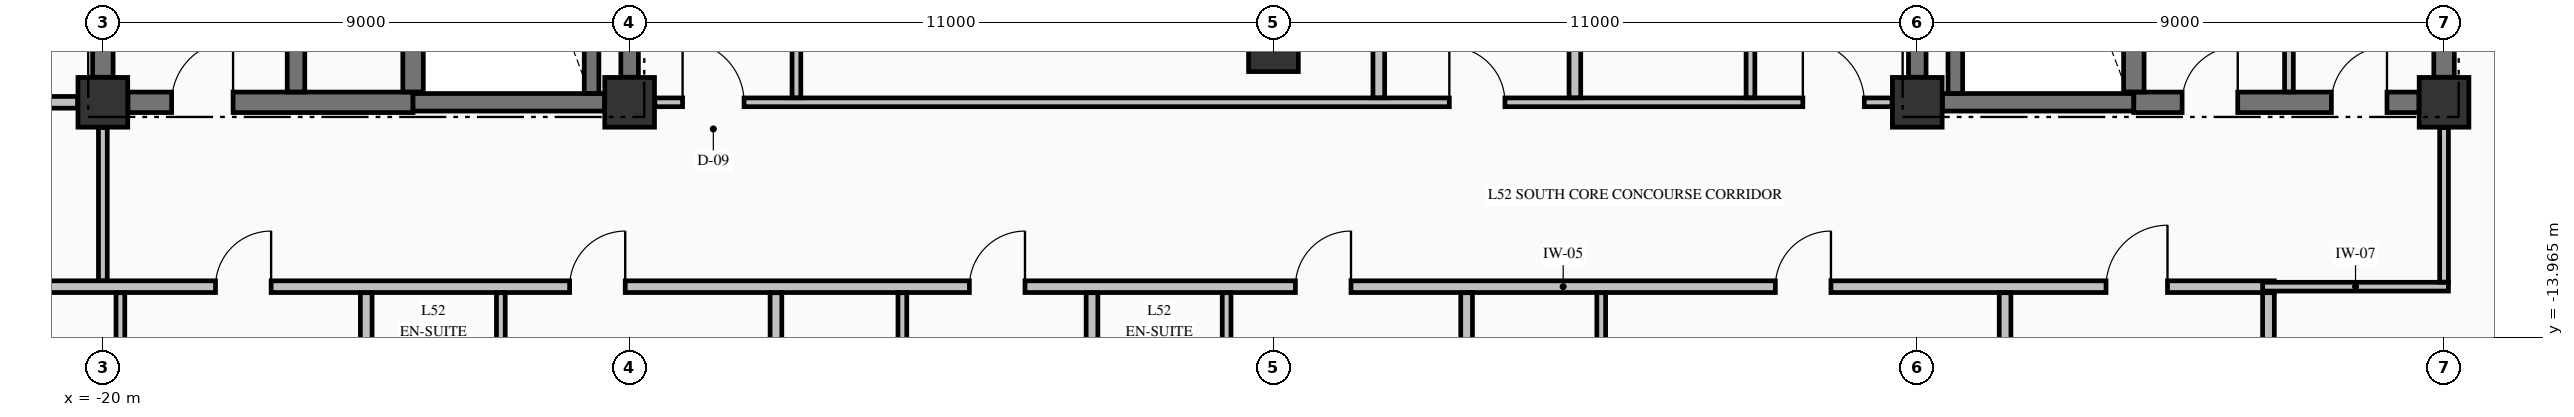
"""IFC4 building model, lengths in metres.
Left out: names, types, materials, properties, quantities, classifications, styles, units other than length and angle.
Written with IfcOpenShell. Run it as: python <this file> out.ifc"""

import sys

from ifc_helpers import new_model, si_unit, direction, frame, frame_2d, origin, origin_2d, place, context, subcontext, project, spatial, rectangle, extrude, element, fill, save


model = new_model("IFC4")
c1 = context("Model", 3, precision=1e-05, world=origin(), true_north=direction((0.0, 1.0)))
c2 = subcontext(c1, "Body", "Model", "MODEL_VIEW")
j1 = project(units=[si_unit("LENGTHUNIT", "METRE"), si_unit("PLANEANGLEUNIT", "RADIAN")], contexts=[c1])
p1 = place(None, origin())
s1 = spatial("IfcSite", under=j1, at=p1, CompositionType="ELEMENT")
p2 = place(p1, origin())
s2 = spatial("IfcBuilding", under=s1, at=p2, CompositionType="ELEMENT")
p3 = place(p2, frame((0.0, 0.0, 201.66)))
s3 = spatial("IfcBuildingStorey", under=s2, at=p3, CompositionType="ELEMENT", Elevation=201.66)
for number, where, z_axis, x_axis in (
    (1, (-20.0, -9.95, -0.25), (0.0, 0.0, 1.0), (1.0, 0.0, 0.0)),
    (2, (-11.0, -9.95, -0.25), (0.0, 0.0, 1.0), (1.0, 0.0, 0.0)),
    (3, (11.0, -9.95, -0.25), (0.0, 0.0, 1.0), (1.0, 0.0, 0.0)),
    (4, (20.0, -9.95, -0.25), (0.0, 0.0, 1.0), (1.0, 0.0, 0.0)),
    (5, (0.0, -9.0, -0.25), (0.0, 0.0, 1.0), (1.0, 0.0, 0.0)),
):
    element("IfcColumn", number, at=place(p3, frame(where, z_axis=z_axis, x_axis=x_axis)), inside=s3, PredefinedType="COLUMN", context=c2, shape_type="SweptSolid", body=[
        extrude(rectangle(XDim=0.85, YDim=0.85, at=origin_2d()), origin(), (0.0, 0.0, 1.0), 3.4),
    ])
p4 = place(p3, frame((-19.571, -9.95, 0.0), z_axis=(0.0, 0.0, 1.0), x_axis=(1.0, 0.0, 0.0)))
e6 = element("IfcWall", 6, at=p4, inside=s3, PredefinedType="SHEAR", context=c2, shape_type="SweptSolid", body=[
    extrude(rectangle(XDim=4.871, YDim=0.35, at=frame_2d((2.436, 0.0))), origin(), (0.0, 0.0, 1.0), 3.15),
])
p5 = place(p4, frame((0.746, 0.0, 0.0)))
e7 = element("IfcOpeningElement", 7, at=p5, cuts=e6, PredefinedType="OPENING", context=c2, shape_type="SweptSolid", body=[
    extrude(rectangle(XDim=1.05, YDim=2.15, at=frame_2d((0.525, 1.075))), frame((0.0, 0.185, 0.0), z_axis=(0.0, -1.0, 0.0), x_axis=(1.0, 0.0, 0.0)), (0.0, 0.0, 1.0), 0.37),
])
for number, where, z_axis, x_axis in (
    (8, (-14.7, -9.95, 0.0), (0.0, 0.0, 1.0), (1.0, 0.0, 0.0)),
    (9, (11.429, -9.95, 0.0), (0.0, 0.0, 1.0), (1.0, 0.0, 0.0)),
):
    element("IfcWall", number, at=place(p3, frame(where, z_axis=z_axis, x_axis=x_axis)), inside=s3, PredefinedType="SHEAR", context=c2, shape_type="SweptSolid", body=[
        extrude(rectangle(XDim=3.271, YDim=0.3, at=frame_2d((1.635, 0.0))), origin(), (0.0, 0.0, 1.0), 3.15),
    ])
p6 = place(p3, frame((14.7, -9.95, 0.0), z_axis=(0.0, 0.0, 1.0), x_axis=(1.0, 0.0, 0.0)))
e10 = element("IfcWall", 10, at=p6, inside=s3, PredefinedType="SHEAR", context=c2, shape_type="SweptSolid", body=[
    extrude(rectangle(XDim=4.871, YDim=0.35, at=frame_2d((2.436, 0.0))), origin(), (0.0, 0.0, 1.0), 3.15),
])
p7 = place(p6, frame((0.825, 0.0, 0.0)))
e11 = element("IfcOpeningElement", 11, at=p7, cuts=e10, PredefinedType="OPENING", context=c2, shape_type="SweptSolid", body=[
    extrude(rectangle(XDim=0.95, YDim=2.15, at=frame_2d((0.475, 1.075))), frame((0.0, 0.185, 0.0), z_axis=(0.0, -1.0, 0.0), x_axis=(1.0, 0.0, 0.0)), (0.0, 0.0, 1.0), 0.37),
])
p8 = place(p6, frame((3.375, 0.0, 0.0)))
e12 = element("IfcOpeningElement", 12, at=p8, cuts=e10, PredefinedType="OPENING", context=c2, shape_type="SweptSolid", body=[
    extrude(rectangle(XDim=0.95, YDim=2.15, at=frame_2d((0.475, 1.075))), frame((0.0, 0.185, 0.0), z_axis=(0.0, -1.0, 0.0), x_axis=(1.0, 0.0, 0.0)), (0.0, 0.0, 1.0), 0.37),
])
p9 = place(p3, frame((-22.1, -13.1, 0.0), z_axis=(0.0, 0.0, 1.0), x_axis=(1.0, 0.0, 0.0)))
e13 = element("IfcWall", 13, at=p9, inside=s3, PredefinedType="PARTITIONING", context=c2, shape_type="SweptSolid", body=[
    extrude(rectangle(XDim=39.2, YDim=0.2, at=frame_2d((19.6, 0.0))), origin(), (0.0, 0.0, 1.0), 3.15),
])
p10 = place(p9, frame((4.025, 0.0, 0.0)))
e14 = element("IfcOpeningElement", 14, at=p10, cuts=e13, PredefinedType="OPENING", context=c2, shape_type="SweptSolid", body=[
    extrude(rectangle(XDim=0.95, YDim=2.15, at=frame_2d((0.475, 1.075))), frame((0.0, 0.11, 0.0), z_axis=(0.0, -1.0, 0.0), x_axis=(1.0, 0.0, 0.0)), (0.0, 0.0, 1.0), 0.22),
])
p11 = place(p9, frame((10.075, 0.0, 0.0)))
e15 = element("IfcOpeningElement", 15, at=p11, cuts=e13, PredefinedType="OPENING", context=c2, shape_type="SweptSolid", body=[
    extrude(rectangle(XDim=0.95, YDim=2.15, at=frame_2d((0.475, 1.075))), frame((0.0, 0.11, 0.0), z_axis=(0.0, -1.0, 0.0), x_axis=(1.0, 0.0, 0.0)), (0.0, 0.0, 1.0), 0.22),
])
p12 = place(p9, frame((16.905, 0.0, 0.0)))
e16 = element("IfcOpeningElement", 16, at=p12, cuts=e13, PredefinedType="OPENING", context=c2, shape_type="SweptSolid", body=[
    extrude(rectangle(XDim=0.95, YDim=2.15, at=frame_2d((0.475, 1.075))), frame((0.0, 0.11, 0.0), z_axis=(0.0, -1.0, 0.0), x_axis=(1.0, 0.0, 0.0)), (0.0, 0.0, 1.0), 0.22),
])
p13 = place(p9, frame((22.475, 0.0, 0.0)))
e17 = element("IfcOpeningElement", 17, at=p13, cuts=e13, PredefinedType="OPENING", context=c2, shape_type="SweptSolid", body=[
    extrude(rectangle(XDim=0.95, YDim=2.15, at=frame_2d((0.475, 1.075))), frame((0.0, 0.11, 0.0), z_axis=(0.0, -1.0, 0.0), x_axis=(1.0, 0.0, 0.0)), (0.0, 0.0, 1.0), 0.22),
])
p14 = place(p9, frame((30.675, 0.0, 0.0)))
e18 = element("IfcOpeningElement", 18, at=p14, cuts=e13, PredefinedType="OPENING", context=c2, shape_type="SweptSolid", body=[
    extrude(rectangle(XDim=0.95, YDim=2.15, at=frame_2d((0.475, 1.075))), frame((0.0, 0.11, 0.0), z_axis=(0.0, -1.0, 0.0), x_axis=(1.0, 0.0, 0.0)), (0.0, 0.0, 1.0), 0.22),
])
p15 = place(p9, frame((36.325, 0.0, 0.0)))
e19 = element("IfcOpeningElement", 19, at=p15, cuts=e13, PredefinedType="OPENING", context=c2, shape_type="SweptSolid", body=[
    extrude(rectangle(XDim=1.05, YDim=2.15, at=frame_2d((0.525, 1.075))), frame((0.0, 0.11, 0.0), z_axis=(0.0, -1.0, 0.0), x_axis=(1.0, 0.0, 0.0)), (0.0, 0.0, 1.0), 0.22),
])
p16 = place(p3, frame((16.9, -13.1, 0.0), z_axis=(0.0, 0.0, 1.0), x_axis=(1.0, 0.0, 0.0)))
e20 = element("IfcWall", 20, at=p16, inside=s3, PredefinedType="PARTITIONING", context=c2, shape_type="SweptSolid", body=[
    extrude(rectangle(XDim=3.175, YDim=0.15, at=frame_2d((1.587, 0.0))), origin(), (0.0, 0.0, 1.0), 3.15),
])
p17 = place(p3, frame((-26.835, -9.95, 0.0), z_axis=(0.0, 0.0, 1.0), x_axis=(1.0, 0.0, 0.0)))
e21 = element("IfcWall", 21, at=p17, inside=s3, PredefinedType="PARTITIONING", context=c2, shape_type="SweptSolid", body=[
    extrude(rectangle(XDim=6.404, YDim=0.2, at=frame_2d((3.202, 0.0))), origin(), (0.0, 0.0, 1.0), 3.15),
])
p18 = place(p3, frame((-10.569, -9.95, 0.0), z_axis=(0.0, 0.0, 1.0), x_axis=(1.0, 0.0, 0.0)))
e22 = element("IfcWall", 22, at=p18, inside=s3, PredefinedType="PARTITIONING", context=c2, shape_type="SweptSolid", body=[
    extrude(rectangle(XDim=21.138, YDim=0.15, at=frame_2d((10.569, 0.0))), origin(), (0.0, 0.0, 1.0), 3.15),
])
p19 = place(p18, frame((0.474, 0.0, 0.0)))
e23 = element("IfcOpeningElement", 23, at=p19, cuts=e22, PredefinedType="OPENING", context=c2, shape_type="SweptSolid", body=[
    extrude(rectangle(XDim=1.05, YDim=2.15, at=frame_2d((0.525, 1.075))), frame((0.0, 0.085, 0.0), z_axis=(0.0, -1.0, 0.0), x_axis=(1.0, 0.0, 0.0)), (0.0, 0.0, 1.0), 0.17),
])
p20 = place(p18, frame((19.614, 0.0, 0.0)))
e24 = element("IfcOpeningElement", 24, at=p20, cuts=e22, PredefinedType="OPENING", context=c2, shape_type="SweptSolid", body=[
    extrude(rectangle(XDim=1.05, YDim=2.15, at=frame_2d((0.525, 1.075))), frame((0.0, 0.085, 0.0), z_axis=(0.0, -1.0, 0.0), x_axis=(1.0, 0.0, 0.0)), (0.0, 0.0, 1.0), 0.17),
])
p21 = place(p18, frame((13.574, 0.0, 0.0)))
e25 = element("IfcOpeningElement", 25, at=p21, cuts=e22, PredefinedType="OPENING", context=c2, shape_type="SweptSolid", body=[
    extrude(rectangle(XDim=0.95, YDim=2.15, at=frame_2d((0.475, 1.075))), frame((0.0, 0.085, 0.0), z_axis=(0.0, -1.0, 0.0), x_axis=(1.0, 0.0, 0.0)), (0.0, 0.0, 1.0), 0.17),
])
p22 = place(p3, frame((-20.0, -9.521, 0.0), z_axis=(0.0, 0.0, 1.0), x_axis=(0.0, 1.0, 0.0)))
e26 = element("IfcWall", 26, at=p22, inside=s3, PredefinedType="SHEAR", context=c2, shape_type="SweptSolid", body=[
    extrude(rectangle(XDim=9.092, YDim=0.35, at=frame_2d((4.546, 0.0))), origin(), (0.0, 0.0, 1.0), 3.15),
])
p23 = place(p3, frame((-16.7, -9.773, 0.0), z_axis=(0.0, 0.0, 1.0), x_axis=(0.0, 1.0, 0.0)))
e27 = element("IfcWall", 27, at=p23, inside=s3, PredefinedType="SHEAR", context=c2, shape_type="SweptSolid", body=[
    extrude(rectangle(XDim=9.371, YDim=0.3, at=frame_2d((4.686, 0.0))), origin(), (0.0, 0.0, 1.0), 3.15),
])
p24 = place(p3, frame((-14.7, -9.773, 0.0), z_axis=(0.0, 0.0, 1.0), x_axis=(0.0, 1.0, 0.0)))
e28 = element("IfcWall", 28, at=p24, inside=s3, PredefinedType="SHEAR", context=c2, shape_type="SweptSolid", body=[
    extrude(rectangle(XDim=9.371, YDim=0.35, at=frame_2d((4.686, 0.0))), origin(), (0.0, 0.0, 1.0), 3.15),
])
p25 = place(p3, frame((-11.65, -9.798, 0.0), z_axis=(0.0, 0.0, 1.0), x_axis=(0.0, 1.0, 0.0)))
e29 = element("IfcWall", 29, at=p25, inside=s3, PredefinedType="SOLIDWALL", context=c2, shape_type="SweptSolid", body=[
    extrude(rectangle(XDim=9.396, YDim=0.25, at=frame_2d((4.698, 0.0))), origin(), (0.0, 0.0, 1.0), 3.15),
])
for number, where, z_axis, x_axis in (
    (30, (-11.0, -9.521, 0.0), (0.0, 0.0, 1.0), (0.0, 1.0, 0.0)),
    (31, (11.0, -9.521, 0.0), (0.0, 0.0, 1.0), (0.0, 1.0, 0.0)),
):
    element("IfcWall", number, at=place(p3, frame(where, z_axis=z_axis, x_axis=x_axis)), inside=s3, PredefinedType="SHEAR", context=c2, shape_type="SweptSolid", body=[
        extrude(rectangle(XDim=9.092, YDim=0.3, at=frame_2d((4.546, 0.0))), origin(), (0.0, 0.0, 1.0), 3.15),
    ])
p26 = place(p3, frame((11.65, -9.798, 0.0), z_axis=(0.0, 0.0, 1.0), x_axis=(0.0, 1.0, 0.0)))
e32 = element("IfcWall", 32, at=p26, inside=s3, PredefinedType="SOLIDWALL", context=c2, shape_type="SweptSolid", body=[
    extrude(rectangle(XDim=9.396, YDim=0.25, at=frame_2d((4.698, 0.0))), origin(), (0.0, 0.0, 1.0), 3.15),
])
p27 = place(p3, frame((14.7, -9.773, 0.0), z_axis=(0.0, 0.0, 1.0), x_axis=(0.0, 1.0, 0.0)))
e33 = element("IfcWall", 33, at=p27, inside=s3, PredefinedType="SHEAR", context=c2, shape_type="SweptSolid", body=[
    extrude(rectangle(XDim=9.371, YDim=0.35, at=frame_2d((4.686, 0.0))), origin(), (0.0, 0.0, 1.0), 3.15),
])
p28 = place(p3, frame((20.0, -9.521, 0.0), z_axis=(0.0, 0.0, 1.0), x_axis=(0.0, 1.0, 0.0)))
e34 = element("IfcWall", 34, at=p28, inside=s3, PredefinedType="SHEAR", context=c2, shape_type="SweptSolid", body=[
    extrude(rectangle(XDim=9.092, YDim=0.35, at=frame_2d((4.546, 0.0))), origin(), (0.0, 0.0, 1.0), 3.15),
])
p29 = place(p3, frame((-20.0, -12.997, 0.0), z_axis=(0.0, 0.0, 1.0), x_axis=(0.0, 1.0, 0.0)))
e35 = element("IfcWall", 35, at=p29, inside=s3, PredefinedType="PARTITIONING", context=c2, shape_type="SweptSolid", body=[
    extrude(rectangle(XDim=2.616, YDim=0.15, at=frame_2d((1.308, 0.0))), origin(), (0.0, 0.0, 1.0), 2.342),
])
p30 = place(p3, frame((-19.7, -15.272, 0.0), z_axis=(0.0, 0.0, 1.0), x_axis=(0.0, 1.0, 0.0)))
e36 = element("IfcWall", 36, at=p30, inside=s3, PredefinedType="PARTITIONING", context=c2, shape_type="SweptSolid", body=[
    extrude(rectangle(XDim=2.069, YDim=0.15, at=frame_2d((1.035, 0.0))), origin(), (0.0, 0.0, 1.0), 2.342),
])
p31 = place(p3, frame((-15.5, -15.972, 0.0), z_axis=(0.0, 0.0, 1.0), x_axis=(0.0, 1.0, 0.0)))
e37 = element("IfcWall", 37, at=p31, inside=s3, PredefinedType="PARTITIONING", context=c2, shape_type="SweptSolid", body=[
    extrude(rectangle(XDim=2.769, YDim=0.2, at=frame_2d((1.385, 0.0))), origin(), (0.0, 0.0, 1.0), 3.15),
])
p32 = place(p3, frame((-13.2, -15.972, 0.0), z_axis=(0.0, 0.0, 1.0), x_axis=(0.0, 1.0, 0.0)))
e38 = element("IfcWall", 38, at=p32, inside=s3, PredefinedType="PARTITIONING", context=c2, shape_type="SweptSolid", body=[
    extrude(rectangle(XDim=2.769, YDim=0.15, at=frame_2d((1.385, 0.0))), origin(), (0.0, 0.0, 1.0), 3.15),
])
p33 = place(p3, frame((-8.5, -15.272, 0.0), z_axis=(0.0, 0.0, 1.0), x_axis=(0.0, 1.0, 0.0)))
e39 = element("IfcWall", 39, at=p33, inside=s3, PredefinedType="PARTITIONING", context=c2, shape_type="SweptSolid", body=[
    extrude(rectangle(XDim=2.069, YDim=0.2, at=frame_2d((1.035, 0.0))), origin(), (0.0, 0.0, 1.0), 3.15),
])
p34 = place(p3, frame((-8.15, -9.872, 0.0), z_axis=(0.0, 0.0, 1.0), x_axis=(0.0, 1.0, 0.0)))
e40 = element("IfcWall", 40, at=p34, inside=s3, PredefinedType="PARTITIONING", context=c2, shape_type="SweptSolid", body=[
    extrude(rectangle(XDim=6.369, YDim=0.15, at=frame_2d((3.185, 0.0))), origin(), (0.0, 0.0, 1.0), 3.15),
])
p35 = place(p34, frame((2.702, 0.0, 0.0)))
e41 = element("IfcOpeningElement", 41, at=p35, cuts=e40, PredefinedType="OPENING", context=c2, shape_type="SweptSolid", body=[
    extrude(rectangle(XDim=1.0, YDim=2.15, at=frame_2d((0.5, 1.075))), frame((0.0, 0.085, 0.0), z_axis=(0.0, -1.0, 0.0), x_axis=(1.0, 0.0, 0.0)), (0.0, 0.0, 1.0), 0.17),
])
p36 = place(p3, frame((-6.34, -15.272, 0.0), z_axis=(0.0, 0.0, 1.0), x_axis=(0.0, 1.0, 0.0)))
e42 = element("IfcWall", 42, at=p36, inside=s3, PredefinedType="PARTITIONING", context=c2, shape_type="SweptSolid", body=[
    extrude(rectangle(XDim=2.069, YDim=0.15, at=frame_2d((1.035, 0.0))), origin(), (0.0, 0.0, 1.0), 3.15),
])
p37 = place(p3, frame((-3.1, -15.972, 0.0), z_axis=(0.0, 0.0, 1.0), x_axis=(0.0, 1.0, 0.0)))
e43 = element("IfcWall", 43, at=p37, inside=s3, PredefinedType="PARTITIONING", context=c2, shape_type="SweptSolid", body=[
    extrude(rectangle(XDim=2.769, YDim=0.2, at=frame_2d((1.385, 0.0))), origin(), (0.0, 0.0, 1.0), 3.15),
])
p38 = place(p3, frame((-0.8, -15.972, 0.0), z_axis=(0.0, 0.0, 1.0), x_axis=(0.0, 1.0, 0.0)))
e44 = element("IfcWall", 44, at=p38, inside=s3, PredefinedType="PARTITIONING", context=c2, shape_type="SweptSolid", body=[
    extrude(rectangle(XDim=2.769, YDim=0.15, at=frame_2d((1.385, 0.0))), origin(), (0.0, 0.0, 1.0), 3.15),
])
p39 = place(p3, frame((1.8, -9.872, 0.0), z_axis=(0.0, 0.0, 1.0), x_axis=(0.0, 1.0, 0.0)))
e45 = element("IfcWall", 45, at=p39, inside=s3, PredefinedType="PARTITIONING", context=c2, shape_type="SweptSolid", body=[
    extrude(rectangle(XDim=4.569, YDim=0.2, at=frame_2d((2.285, 0.0))), origin(), (0.0, 0.0, 1.0), 3.15),
])
p40 = place(p3, frame((3.3, -15.272, 0.0), z_axis=(0.0, 0.0, 1.0), x_axis=(0.0, 1.0, 0.0)))
e46 = element("IfcWall", 46, at=p40, inside=s3, PredefinedType="PARTITIONING", context=c2, shape_type="SweptSolid", body=[
    extrude(rectangle(XDim=2.069, YDim=0.2, at=frame_2d((1.035, 0.0))), origin(), (0.0, 0.0, 1.0), 3.15),
])
p41 = place(p3, frame((5.15, -9.872, 0.0), z_axis=(0.0, 0.0, 1.0), x_axis=(0.0, 1.0, 0.0)))
e47 = element("IfcWall", 47, at=p41, inside=s3, PredefinedType="PARTITIONING", context=c2, shape_type="SweptSolid", body=[
    extrude(rectangle(XDim=4.569, YDim=0.2, at=frame_2d((2.285, 0.0))), origin(), (0.0, 0.0, 1.0), 3.15),
])
p42 = place(p3, frame((5.6, -15.272, 0.0), z_axis=(0.0, 0.0, 1.0), x_axis=(0.0, 1.0, 0.0)))
e48 = element("IfcWall", 48, at=p42, inside=s3, PredefinedType="PARTITIONING", context=c2, shape_type="SweptSolid", body=[
    extrude(rectangle(XDim=2.069, YDim=0.15, at=frame_2d((1.035, 0.0))), origin(), (0.0, 0.0, 1.0), 3.15),
])
p43 = place(p3, frame((8.15, -9.872, 0.0), z_axis=(0.0, 0.0, 1.0), x_axis=(0.0, 1.0, 0.0)))
e49 = element("IfcWall", 49, at=p43, inside=s3, PredefinedType="PARTITIONING", context=c2, shape_type="SweptSolid", body=[
    extrude(rectangle(XDim=4.569, YDim=0.15, at=frame_2d((2.285, 0.0))), origin(), (0.0, 0.0, 1.0), 3.15),
])
p44 = place(p43, frame((1.847, 0.0, 0.0)))
e50 = element("IfcOpeningElement", 50, at=p44, cuts=e49, PredefinedType="OPENING", context=c2, shape_type="SweptSolid", body=[
    extrude(rectangle(XDim=0.95, YDim=2.15, at=frame_2d((0.475, 1.075))), frame((0.0, 0.085, 0.0), z_axis=(0.0, -1.0, 0.0), x_axis=(1.0, 0.0, 0.0)), (0.0, 0.0, 1.0), 0.17),
])
p45 = place(p3, frame((12.5, -24.335, 0.0), z_axis=(0.0, 0.0, 1.0), x_axis=(0.0, 1.0, 0.0)))
e51 = element("IfcWall", 51, at=p45, inside=s3, PredefinedType="PARTITIONING", context=c2, shape_type="SweptSolid", body=[
    extrude(rectangle(XDim=11.132, YDim=0.2, at=frame_2d((5.566, 0.0))), origin(), (0.0, 0.0, 1.0), 3.15),
])
p46 = place(p3, frame((17.0, -18.994, 0.0), z_axis=(0.0, 0.0, 1.0), x_axis=(0.0, 1.0, 0.0)))
e52 = element("IfcWall", 52, at=p46, inside=s3, PredefinedType="PARTITIONING", context=c2, shape_type="SweptSolid", body=[
    extrude(rectangle(XDim=5.791, YDim=0.2, at=frame_2d((2.896, 0.0))), origin(), (0.0, 0.0, 1.0), 3.15),
])
p47 = place(p3, frame((17.35, -9.772, 0.0), z_axis=(0.0, 0.0, 1.0), x_axis=(0.0, 1.0, 0.0)))
e53 = element("IfcWall", 53, at=p47, inside=s3, PredefinedType="PARTITIONING", context=c2, shape_type="SweptSolid", body=[
    extrude(rectangle(XDim=7.194, YDim=0.15, at=frame_2d((3.597, 0.0))), origin(), (0.0, 0.0, 1.0), 3.15),
])
p48 = place(p3, frame((20.0, -13.022, 0.0), z_axis=(0.0, 0.0, 1.0), x_axis=(0.0, 1.0, 0.0)))
e54 = element("IfcWall", 54, at=p48, inside=s3, PredefinedType="PARTITIONING", context=c2, shape_type="SweptSolid", body=[
    extrude(rectangle(XDim=2.641, YDim=0.15, at=frame_2d((1.32, 0.0))), origin(), (0.0, 0.0, 1.0), 2.342),
])
p49 = place(p5, origin())
e55 = element("IfcDoor", 55, at=p49, inside=s3, OperationType="SINGLE_SWING_RIGHT", PredefinedType="DOOR", context=c2, shape_type="SweptSolid", body=[
    extrude(rectangle(XDim=1.05, YDim=2.15, at=frame_2d((0.525, 1.075))), frame((0.0, 0.025, 0.0), z_axis=(0.0, -1.0, 0.0), x_axis=(1.0, 0.0, 0.0)), (0.0, 0.0, 1.0), 0.05),
])
fill(e7, e55)
p50 = place(p7, origin())
e56 = element("IfcDoor", 56, at=p50, inside=s3, OperationType="SINGLE_SWING_RIGHT", PredefinedType="DOOR", context=c2, shape_type="SweptSolid", body=[
    extrude(rectangle(XDim=0.95, YDim=2.15, at=frame_2d((0.475, 1.075))), frame((0.0, 0.025, 0.0), z_axis=(0.0, -1.0, 0.0), x_axis=(1.0, 0.0, 0.0)), (0.0, 0.0, 1.0), 0.05),
])
fill(e11, e56)
p51 = place(p8, origin())
e57 = element("IfcDoor", 57, at=p51, inside=s3, OperationType="SINGLE_SWING_RIGHT", PredefinedType="DOOR", context=c2, shape_type="SweptSolid", body=[
    extrude(rectangle(XDim=0.95, YDim=2.15, at=frame_2d((0.475, 1.075))), frame((0.0, 0.025, 0.0), z_axis=(0.0, -1.0, 0.0), x_axis=(1.0, 0.0, 0.0)), (0.0, 0.0, 1.0), 0.05),
])
fill(e12, e57)
p52 = place(p19, origin())
e58 = element("IfcDoor", 58, at=p52, inside=s3, OperationType="SINGLE_SWING_LEFT", PredefinedType="DOOR", context=c2, shape_type="SweptSolid", body=[
    extrude(rectangle(XDim=1.05, YDim=2.15, at=frame_2d((0.525, 1.075))), frame((0.0, 0.025, 0.0), z_axis=(0.0, -1.0, 0.0), x_axis=(1.0, 0.0, 0.0)), (0.0, 0.0, 1.0), 0.05),
])
fill(e23, e58)
p53 = place(p20, origin())
e59 = element("IfcDoor", 59, at=p53, inside=s3, OperationType="SINGLE_SWING_LEFT", PredefinedType="DOOR", context=c2, shape_type="SweptSolid", body=[
    extrude(rectangle(XDim=1.05, YDim=2.15, at=frame_2d((0.525, 1.075))), frame((0.0, 0.025, 0.0), z_axis=(0.0, -1.0, 0.0), x_axis=(1.0, 0.0, 0.0)), (0.0, 0.0, 1.0), 0.05),
])
fill(e24, e59)
p54 = place(p10, origin())
e60 = element("IfcDoor", 60, at=p54, inside=s3, OperationType="SINGLE_SWING_RIGHT", PredefinedType="DOOR", context=c2, shape_type="SweptSolid", body=[
    extrude(rectangle(XDim=0.95, YDim=2.15, at=frame_2d((0.475, 1.075))), frame((0.0, 0.025, 0.0), z_axis=(0.0, -1.0, 0.0), x_axis=(1.0, 0.0, 0.0)), (0.0, 0.0, 1.0), 0.05),
])
fill(e14, e60)
p55 = place(p11, origin())
e61 = element("IfcDoor", 61, at=p55, inside=s3, OperationType="SINGLE_SWING_RIGHT", PredefinedType="DOOR", context=c2, shape_type="SweptSolid", body=[
    extrude(rectangle(XDim=0.95, YDim=2.15, at=frame_2d((0.475, 1.075))), frame((0.0, 0.025, 0.0), z_axis=(0.0, -1.0, 0.0), x_axis=(1.0, 0.0, 0.0)), (0.0, 0.0, 1.0), 0.05),
])
fill(e15, e61)
p56 = place(p12, origin())
e62 = element("IfcDoor", 62, at=p56, inside=s3, OperationType="SINGLE_SWING_RIGHT", PredefinedType="DOOR", context=c2, shape_type="SweptSolid", body=[
    extrude(rectangle(XDim=0.95, YDim=2.15, at=frame_2d((0.475, 1.075))), frame((0.0, 0.025, 0.0), z_axis=(0.0, -1.0, 0.0), x_axis=(1.0, 0.0, 0.0)), (0.0, 0.0, 1.0), 0.05),
])
fill(e16, e62)
p57 = place(p13, origin())
e63 = element("IfcDoor", 63, at=p57, inside=s3, OperationType="SINGLE_SWING_RIGHT", PredefinedType="DOOR", context=c2, shape_type="SweptSolid", body=[
    extrude(rectangle(XDim=0.95, YDim=2.15, at=frame_2d((0.475, 1.075))), frame((0.0, 0.025, 0.0), z_axis=(0.0, -1.0, 0.0), x_axis=(1.0, 0.0, 0.0)), (0.0, 0.0, 1.0), 0.05),
])
fill(e17, e63)
p58 = place(p14, origin())
e64 = element("IfcDoor", 64, at=p58, inside=s3, OperationType="SINGLE_SWING_RIGHT", PredefinedType="DOOR", context=c2, shape_type="SweptSolid", body=[
    extrude(rectangle(XDim=0.95, YDim=2.15, at=frame_2d((0.475, 1.075))), frame((0.0, 0.025, 0.0), z_axis=(0.0, -1.0, 0.0), x_axis=(1.0, 0.0, 0.0)), (0.0, 0.0, 1.0), 0.05),
])
fill(e18, e64)
p59 = place(p15, origin())
e65 = element("IfcDoor", 65, at=p59, inside=s3, OperationType="SINGLE_SWING_RIGHT", PredefinedType="DOOR", context=c2, shape_type="SweptSolid", body=[
    extrude(rectangle(XDim=1.05, YDim=2.15, at=frame_2d((0.525, 1.075))), frame((0.0, 0.025, 0.0), z_axis=(0.0, -1.0, 0.0), x_axis=(1.0, 0.0, 0.0)), (0.0, 0.0, 1.0), 0.05),
])
fill(e19, e65)
p60 = place(p21, origin())
e66 = element("IfcDoor", 66, at=p60, inside=s3, OperationType="SINGLE_SWING_LEFT", PredefinedType="DOOR", context=c2, shape_type="SweptSolid", body=[
    extrude(rectangle(XDim=0.95, YDim=2.15, at=frame_2d((0.475, 1.075))), frame((0.0, 0.025, 0.0), z_axis=(0.0, -1.0, 0.0), x_axis=(1.0, 0.0, 0.0)), (0.0, 0.0, 1.0), 0.05),
])
fill(e25, e66)
save(model, sys.argv[1])
